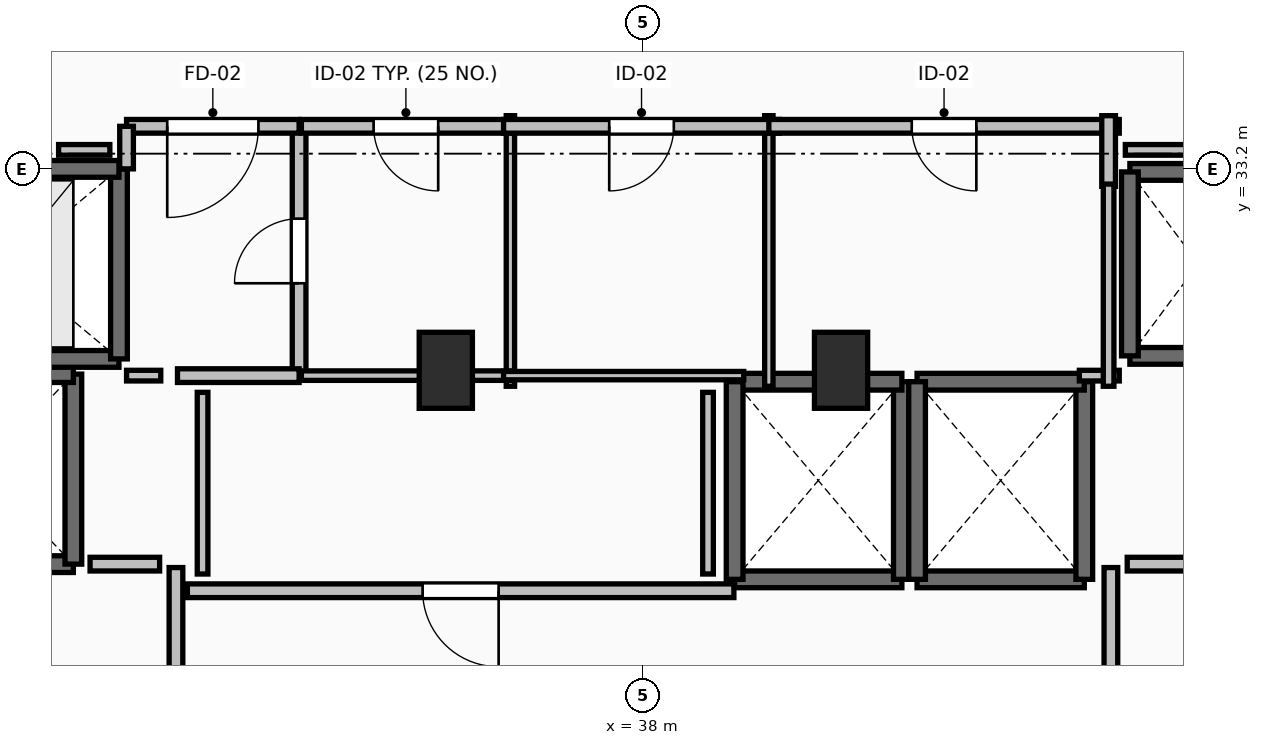
"""IFC4 building model, lengths in metres.
Left out: names, types, materials, properties, quantities, classifications, styles, units other than length and angle.
Written with IfcOpenShell. Run it as: python <this file> out.ifc"""

import sys

from ifc_helpers import new_model, si_unit, direction, frame, frame_2d, origin, origin_2d, place, context, subcontext, project, spatial, rectangle, extrude, element, fill, save


model = new_model("IFC4")
c1 = context("Model", 3, precision=1e-05, world=origin(), true_north=direction((0.0, 1.0)))
c2 = subcontext(c1, "Body", "Model", "MODEL_VIEW")
j1 = project(units=[si_unit("LENGTHUNIT", "METRE"), si_unit("PLANEANGLEUNIT", "RADIAN")], contexts=[c1])
p1 = place(None, origin())
s1 = spatial("IfcSite", under=j1, at=p1, CompositionType="ELEMENT")
p2 = place(p1, origin())
s2 = spatial("IfcBuilding", under=s1, at=p2, CompositionType="ELEMENT")
p3 = place(p2, frame((0.0, 0.0, 196.6)))
s3 = spatial("IfcBuildingStorey", under=s2, at=p3, CompositionType="ELEMENT", Elevation=196.6)
for number, where, z_axis, x_axis in (
    (1, (35.4, 30.55, 0.0), (0.0, 0.0, 1.0), (1.0, 0.0, 0.0)),
    (2, (40.6, 30.55, 0.0), (0.0, 0.0, 1.0), (1.0, 0.0, 0.0)),
):
    element("IfcColumn", number, at=place(p3, frame(where, z_axis=z_axis, x_axis=x_axis)), inside=s3, PredefinedType="PILASTER", context=c2, shape_type="SweptSolid", body=[
        extrude(rectangle(XDim=0.7, YDim=1.0, at=origin_2d()), origin(), (0.0, 0.0, 1.0), 3.5),
    ])
p4 = place(p3, frame((39.2, 27.8, 0.0), z_axis=(0.0, 0.0, 1.0), x_axis=(1.0, 0.0, 0.0)))
e3 = element("IfcWall", 3, at=p4, inside=s3, PredefinedType="SOLIDWALL", context=c2, shape_type="SweptSolid", body=[
    extrude(rectangle(XDim=2.2, YDim=0.22, at=frame_2d((1.1, 0.0))), origin(), (0.0, 0.0, 1.0), 3.24),
])
p5 = place(p3, frame((41.4, 27.8, 0.0), z_axis=(0.0, 0.0, 1.0), x_axis=(0.0, 1.0, 0.0)))
e4 = element("IfcWall", 4, at=p5, inside=s3, PredefinedType="SOLIDWALL", context=c2, shape_type="SweptSolid", body=[
    extrude(rectangle(XDim=2.6, YDim=0.22, at=frame_2d((1.3, 0.0))), origin(), (0.0, 0.0, 1.0), 3.24),
])
p6 = place(p3, frame((41.4, 30.4, 0.0), z_axis=(0.0, 0.0, 1.0), x_axis=(-1.0, 0.0, 0.0)))
e5 = element("IfcWall", 5, at=p6, inside=s3, PredefinedType="SOLIDWALL", context=c2, shape_type="SweptSolid", body=[
    extrude(rectangle(XDim=2.2, YDim=0.22, at=frame_2d((1.1, 0.0))), origin(), (0.0, 0.0, 1.0), 3.24),
])
p7 = place(p3, frame((39.2, 30.4, 0.0), z_axis=(0.0, 0.0, 1.0), x_axis=(0.0, -1.0, 0.0)))
e6 = element("IfcWall", 6, at=p7, inside=s3, PredefinedType="SOLIDWALL", context=c2, shape_type="SweptSolid", body=[
    extrude(rectangle(XDim=2.6, YDim=0.22, at=frame_2d((1.3, 0.0))), origin(), (0.0, 0.0, 1.0), 3.24),
])
p8 = place(p3, frame((41.6, 27.8, 0.0), z_axis=(0.0, 0.0, 1.0), x_axis=(1.0, 0.0, 0.0)))
e7 = element("IfcWall", 7, at=p8, inside=s3, PredefinedType="SOLIDWALL", context=c2, shape_type="SweptSolid", body=[
    extrude(rectangle(XDim=2.2, YDim=0.22, at=frame_2d((1.1, 0.0))), origin(), (0.0, 0.0, 1.0), 3.24),
])
p9 = place(p3, frame((43.8, 27.8, 0.0), z_axis=(0.0, 0.0, 1.0), x_axis=(0.0, 1.0, 0.0)))
e8 = element("IfcWall", 8, at=p9, inside=s3, PredefinedType="SOLIDWALL", context=c2, shape_type="SweptSolid", body=[
    extrude(rectangle(XDim=2.6, YDim=0.22, at=frame_2d((1.3, 0.0))), origin(), (0.0, 0.0, 1.0), 3.24),
])
p10 = place(p3, frame((43.8, 30.4, 0.0), z_axis=(0.0, 0.0, 1.0), x_axis=(-1.0, 0.0, 0.0)))
e9 = element("IfcWall", 9, at=p10, inside=s3, PredefinedType="SOLIDWALL", context=c2, shape_type="SweptSolid", body=[
    extrude(rectangle(XDim=2.2, YDim=0.22, at=frame_2d((1.1, 0.0))), origin(), (0.0, 0.0, 1.0), 3.24),
])
p11 = place(p3, frame((41.6, 30.4, 0.0), z_axis=(0.0, 0.0, 1.0), x_axis=(0.0, -1.0, 0.0)))
e10 = element("IfcWall", 10, at=p11, inside=s3, PredefinedType="SOLIDWALL", context=c2, shape_type="SweptSolid", body=[
    extrude(rectangle(XDim=2.6, YDim=0.22, at=frame_2d((1.3, 0.0))), origin(), (0.0, 0.0, 1.0), 3.24),
])
for number, where, z_axis, x_axis in (
    (11, (44.4, 30.74, 0.0), (0.0, 0.0, 1.0), (1.0, 0.0, 0.0)),
    (12, (46.2, 33.16, 0.0), (0.0, 0.0, 1.0), (-1.0, 0.0, 0.0)),
):
    element("IfcWall", number, at=place(p3, frame(where, z_axis=z_axis, x_axis=x_axis)), inside=s3, PredefinedType="SOLIDWALL", context=c2, shape_type="SweptSolid", body=[
        extrude(rectangle(XDim=1.8, YDim=0.22, at=frame_2d((0.9, 0.0))), origin(), (0.0, 0.0, 1.0), 3.24),
    ])
p12 = place(p3, frame((44.4, 33.16, 0.0), z_axis=(0.0, 0.0, 1.0), x_axis=(0.0, -1.0, 0.0)))
e13 = element("IfcWall", 13, at=p12, inside=s3, PredefinedType="SOLIDWALL", context=c2, shape_type="SweptSolid", body=[
    extrude(rectangle(XDim=2.42, YDim=0.22, at=frame_2d((1.21, 0.0))), origin(), (0.0, 0.0, 1.0), 3.24),
])
p13 = place(p3, frame((28.1, 28.0, 0.0), z_axis=(0.0, 0.0, 1.0), x_axis=(1.0, 0.0, 0.0)))
e14 = element("IfcWall", 14, at=p13, inside=s3, PredefinedType="SHEAR", context=c2, shape_type="SweptSolid", body=[
    extrude(rectangle(XDim=2.4, YDim=0.22, at=frame_2d((1.2, 0.0))), origin(), (0.0, 0.0, 1.0), 3.24),
])
p14 = place(p13, frame((0.6, 0.0, 0.0)))
e15 = element("IfcOpeningElement", 15, at=p14, cuts=e14, PredefinedType="OPENING", context=c2, shape_type="SweptSolid", body=[
    extrude(rectangle(XDim=1.2, YDim=2.2, at=frame_2d((0.6, 1.1))), frame((0.0, 0.125, 0.0), z_axis=(0.0, -1.0, 0.0), x_axis=(1.0, 0.0, 0.0)), (0.0, 0.0, 1.0), 0.25),
])
p15 = place(p3, frame((30.5, 28.0, 0.0), z_axis=(0.0, 0.0, 1.0), x_axis=(0.0, 1.0, 0.0)))
e16 = element("IfcWall", 16, at=p15, inside=s3, PredefinedType="SHEAR", context=c2, shape_type="SweptSolid", body=[
    extrude(rectangle(XDim=2.5, YDim=0.22, at=frame_2d((1.25, 0.0))), origin(), (0.0, 0.0, 1.0), 3.24),
])
p16 = place(p3, frame((30.5, 30.5, 0.0), z_axis=(0.0, 0.0, 1.0), x_axis=(-1.0, 0.0, 0.0)))
e17 = element("IfcWall", 17, at=p16, inside=s3, PredefinedType="SHEAR", context=c2, shape_type="SweptSolid", body=[
    extrude(rectangle(XDim=2.4, YDim=0.22, at=frame_2d((1.2, 0.0))), origin(), (0.0, 0.0, 1.0), 3.24),
])
p17 = place(p3, frame((28.1, 30.7, 0.0), z_axis=(0.0, 0.0, 1.0), x_axis=(1.0, 0.0, 0.0)))
e18 = element("IfcWall", 18, at=p17, inside=s3, PredefinedType="SOLIDWALL", context=c2, shape_type="SweptSolid", body=[
    extrude(rectangle(XDim=3.0, YDim=0.22, at=frame_2d((1.5, 0.0))), origin(), (0.0, 0.0, 1.0), 3.24),
])
p18 = place(p3, frame((31.1, 30.7, 0.0), z_axis=(0.0, 0.0, 1.0), x_axis=(0.0, 1.0, 0.0)))
e19 = element("IfcWall", 19, at=p18, inside=s3, PredefinedType="SOLIDWALL", context=c2, shape_type="SweptSolid", body=[
    extrude(rectangle(XDim=2.5, YDim=0.22, at=frame_2d((1.25, 0.0))), origin(), (0.0, 0.0, 1.0), 3.24),
])
p19 = place(p3, frame((31.1, 33.2, 0.0), z_axis=(0.0, 0.0, 1.0), x_axis=(-1.0, 0.0, 0.0)))
e20 = element("IfcWall", 20, at=p19, inside=s3, PredefinedType="SOLIDWALL", context=c2, shape_type="SweptSolid", body=[
    extrude(rectangle(XDim=3.0, YDim=0.22, at=frame_2d((1.5, 0.0))), origin(), (0.0, 0.0, 1.0), 3.24),
])
p20 = place(p19, frame((0.9, 0.0, 0.0)))
e21 = element("IfcOpeningElement", 21, at=p20, cuts=e20, PredefinedType="OPENING", context=c2, shape_type="SweptSolid", body=[
    extrude(rectangle(XDim=1.2, YDim=2.2, at=frame_2d((0.6, 1.1))), frame((0.0, 0.125, 0.0), z_axis=(0.0, -1.0, 0.0), x_axis=(1.0, 0.0, 0.0)), (0.0, 0.0, 1.0), 0.25),
])
p21 = place(p3, frame((31.85, 24.045, 0.0), z_axis=(0.0, 0.0, 1.0), x_axis=(0.0, 1.0, 0.0)))
e22 = element("IfcWall", 22, at=p21, inside=s3, PredefinedType="PARTITIONING", context=c2, shape_type="SweptSolid", body=[
    extrude(rectangle(XDim=3.91, YDim=0.18, at=frame_2d((1.955, 0.0))), origin(), (0.0, 0.0, 1.0), 3.24),
])
p22 = place(p21, frame((1.355, 0.0, 0.0)))
e23 = element("IfcOpeningElement", 23, at=p22, cuts=e22, PredefinedType="OPENING", context=c2, shape_type="SweptSolid", body=[
    extrude(rectangle(XDim=1.2, YDim=2.15, at=frame_2d((0.6, 1.075))), frame((0.0, 0.105, 0.0), z_axis=(0.0, -1.0, 0.0), x_axis=(1.0, 0.0, 0.0)), (0.0, 0.0, 1.0), 0.21),
])
p23 = place(p3, frame((44.15, 27.955, 0.0), z_axis=(0.0, 0.0, 1.0), x_axis=(0.0, -1.0, 0.0)))
e24 = element("IfcWall", 24, at=p23, inside=s3, PredefinedType="PARTITIONING", context=c2, shape_type="SweptSolid", body=[
    extrude(rectangle(XDim=3.91, YDim=0.18, at=frame_2d((1.955, 0.0))), origin(), (0.0, 0.0, 1.0), 3.24),
])
p24 = place(p23, frame((1.355, 0.0, 0.0)))
e25 = element("IfcOpeningElement", 25, at=p24, cuts=e24, PredefinedType="OPENING", context=c2, shape_type="SweptSolid", body=[
    extrude(rectangle(XDim=1.2, YDim=2.15, at=frame_2d((0.6, 1.075))), frame((0.0, 0.105, 0.0), z_axis=(0.0, -1.0, 0.0), x_axis=(1.0, 0.0, 0.0)), (0.0, 0.0, 1.0), 0.21),
])
p25 = place(p3, frame((33.47, 30.48, 0.0), z_axis=(0.0, 0.0, 1.0), x_axis=(0.0, 1.0, 0.0)))
e26 = element("IfcWall", 26, at=p25, inside=s3, PredefinedType="PARTITIONING", context=c2, shape_type="SweptSolid", body=[
    extrude(rectangle(XDim=3.28, YDim=0.18, at=frame_2d((1.64, 0.0))), origin(), (0.0, 0.0, 1.0), 3.24),
])
p26 = place(p25, frame((1.215, 0.0, 0.0)))
e27 = element("IfcOpeningElement", 27, at=p26, cuts=e26, PredefinedType="OPENING", context=c2, shape_type="SweptSolid", body=[
    extrude(rectangle(XDim=0.85, YDim=2.1, at=frame_2d((0.425, 1.05))), frame((0.0, 0.105, 0.0), z_axis=(0.0, -1.0, 0.0), x_axis=(1.0, 0.0, 0.0)), (0.0, 0.0, 1.0), 0.21),
])
p27 = place(p3, frame((31.87, 30.48, 0.0), z_axis=(0.0, 0.0, 1.0), x_axis=(1.0, 0.0, 0.0)))
e28 = element("IfcWall", 28, at=p27, inside=s3, PredefinedType="PARTITIONING", context=c2, shape_type="SweptSolid", body=[
    extrude(rectangle(XDim=1.6, YDim=0.18, at=frame_2d((0.8, 0.0))), origin(), (0.0, 0.0, 1.0), 3.24),
])
p28 = place(p3, frame((33.47, 33.76, 0.0), z_axis=(0.0, 0.0, 1.0), x_axis=(-1.0, 0.0, 0.0)))
e29 = element("IfcWall", 29, at=p28, inside=s3, PredefinedType="PARTITIONING", context=c2, shape_type="SweptSolid", body=[
    extrude(rectangle(XDim=2.27, YDim=0.18, at=frame_2d((1.135, 0.0))), origin(), (0.0, 0.0, 1.0), 3.24),
])
p29 = place(p28, frame((0.535, 0.0, 0.0)))
e30 = element("IfcOpeningElement", 30, at=p29, cuts=e29, PredefinedType="OPENING", context=c2, shape_type="SweptSolid", body=[
    extrude(rectangle(XDim=1.2, YDim=2.15, at=frame_2d((0.6, 1.075))), frame((0.0, 0.105, 0.0), z_axis=(0.0, -1.0, 0.0), x_axis=(1.0, 0.0, 0.0)), (0.0, 0.0, 1.0), 0.21),
])
p30 = place(p3, frame((31.2, 33.76, 0.0), z_axis=(0.0, 0.0, 1.0), x_axis=(0.0, -1.0, 0.0)))
e31 = element("IfcWall", 31, at=p30, inside=s3, PredefinedType="PARTITIONING", context=c2, shape_type="SweptSolid", body=[
    extrude(rectangle(XDim=0.56, YDim=0.18, at=frame_2d((0.28, 0.0))), origin(), (0.0, 0.0, 1.0), 3.24),
])
p31 = place(p3, frame((39.19, 27.65, 0.0), z_axis=(0.0, 0.0, 1.0), x_axis=(-1.0, 0.0, 0.0)))
e32 = element("IfcWall", 32, at=p31, inside=s3, PredefinedType="PARTITIONING", context=c2, shape_type="SweptSolid", body=[
    extrude(rectangle(XDim=7.19, YDim=0.18, at=frame_2d((3.595, 0.0))), origin(), (0.0, 0.0, 1.0), 3.24),
])
p32 = place(p31, frame((3.095, 0.0, 0.0)))
e33 = element("IfcOpeningElement", 33, at=p32, cuts=e32, PredefinedType="OPENING", context=c2, shape_type="SweptSolid", body=[
    extrude(rectangle(XDim=1.0, YDim=2.15, at=frame_2d((0.5, 1.075))), frame((0.0, 0.105, 0.0), z_axis=(0.0, -1.0, 0.0), x_axis=(1.0, 0.0, 0.0)), (0.0, 0.0, 1.0), 0.21),
])
p33 = place(p3, frame((36.25, 30.34, 0.0), z_axis=(0.0, 0.0, 1.0), x_axis=(0.0, 1.0, 0.0)))
e34 = element("IfcWall", 34, at=p33, inside=s3, PredefinedType="PARTITIONING", context=c2, shape_type="SweptSolid", body=[
    extrude(rectangle(XDim=3.56, YDim=0.11, at=frame_2d((1.78, 0.0))), origin(), (0.0, 0.0, 1.0), 2.432),
])
p34 = place(p3, frame((33.5, 30.48, 0.0), z_axis=(0.0, 0.0, 1.0), x_axis=(1.0, 0.0, 0.0)))
e35 = element("IfcWall", 35, at=p34, inside=s3, PredefinedType="PARTITIONING", context=c2, shape_type="SweptSolid", body=[
    extrude(rectangle(XDim=2.75, YDim=0.125, at=frame_2d((1.375, 0.0))), origin(), (0.0, 0.0, 1.0), 2.432),
])
p35 = place(p3, frame((36.25, 33.76, 0.0), z_axis=(0.0, 0.0, 1.0), x_axis=(-1.0, 0.0, 0.0)))
e36 = element("IfcWall", 36, at=p35, inside=s3, PredefinedType="PARTITIONING", context=c2, shape_type="SweptSolid", body=[
    extrude(rectangle(XDim=2.75, YDim=0.18, at=frame_2d((1.375, 0.0))), origin(), (0.0, 0.0, 1.0), 3.24),
])
p36 = place(p35, frame((0.95, 0.0, 0.0)))
e37 = element("IfcOpeningElement", 37, at=p36, cuts=e36, PredefinedType="OPENING", context=c2, shape_type="SweptSolid", body=[
    extrude(rectangle(XDim=0.85, YDim=2.1, at=frame_2d((0.425, 1.05))), frame((0.0, 0.105, 0.0), z_axis=(0.0, -1.0, 0.0), x_axis=(1.0, 0.0, 0.0)), (0.0, 0.0, 1.0), 0.21),
])
p37 = place(p3, frame((39.65, 30.34, 0.0), z_axis=(0.0, 0.0, 1.0), x_axis=(0.0, 1.0, 0.0)))
e38 = element("IfcWall", 38, at=p37, inside=s3, PredefinedType="PARTITIONING", context=c2, shape_type="SweptSolid", body=[
    extrude(rectangle(XDim=3.56, YDim=0.11, at=frame_2d((1.78, 0.0))), origin(), (0.0, 0.0, 1.0), 2.432),
])
p38 = place(p3, frame((36.16, 30.48, 0.0), z_axis=(0.0, 0.0, 1.0), x_axis=(1.0, 0.0, 0.0)))
e39 = element("IfcWall", 39, at=p38, inside=s3, PredefinedType="PARTITIONING", context=c2, shape_type="SweptSolid", body=[
    extrude(rectangle(XDim=3.16, YDim=0.11, at=frame_2d((1.58, 0.0))), origin(), (0.0, 0.0, 1.0), 2.432),
])
p39 = place(p3, frame((39.79, 33.76, 0.0), z_axis=(0.0, 0.0, 1.0), x_axis=(-1.0, 0.0, 0.0)))
e40 = element("IfcWall", 40, at=p39, inside=s3, PredefinedType="PARTITIONING", context=c2, shape_type="SweptSolid", body=[
    extrude(rectangle(XDim=3.63, YDim=0.18, at=frame_2d((1.815, 0.0))), origin(), (0.0, 0.0, 1.0), 3.24),
])
p40 = place(p39, frame((1.39, 0.0, 0.0)))
e41 = element("IfcOpeningElement", 41, at=p40, cuts=e40, PredefinedType="OPENING", context=c2, shape_type="SweptSolid", body=[
    extrude(rectangle(XDim=0.85, YDim=2.1, at=frame_2d((0.425, 1.05))), frame((0.0, 0.105, 0.0), z_axis=(0.0, -1.0, 0.0), x_axis=(1.0, 0.0, 0.0)), (0.0, 0.0, 1.0), 0.21),
])
p41 = place(p3, frame((44.26, 33.76, 0.0), z_axis=(0.0, 0.0, 1.0), x_axis=(-1.0, 0.0, 0.0)))
e42 = element("IfcWall", 42, at=p41, inside=s3, PredefinedType="PARTITIONING", context=c2, shape_type="SweptSolid", body=[
    extrude(rectangle(XDim=4.61, YDim=0.18, at=frame_2d((2.305, 0.0))), origin(), (0.0, 0.0, 1.0), 3.24),
])
p42 = place(p41, frame((1.88, 0.0, 0.0)))
e43 = element("IfcOpeningElement", 43, at=p42, cuts=e42, PredefinedType="OPENING", context=c2, shape_type="SweptSolid", body=[
    extrude(rectangle(XDim=0.85, YDim=2.1, at=frame_2d((0.425, 1.05))), frame((0.0, 0.105, 0.0), z_axis=(0.0, -1.0, 0.0), x_axis=(1.0, 0.0, 0.0)), (0.0, 0.0, 1.0), 0.21),
])
p43 = place(p3, frame((44.12, 32.97, 0.0), z_axis=(0.0, 0.0, 1.0), x_axis=(0.0, 1.0, 0.0)))
e44 = element("IfcWall", 44, at=p43, inside=s3, PredefinedType="PARTITIONING", context=c2, shape_type="SweptSolid", body=[
    extrude(rectangle(XDim=0.93, YDim=0.18, at=frame_2d((0.465, 0.0))), origin(), (0.0, 0.0, 1.0), 3.24),
])
for number, where, z_axis, x_axis in (
    (45, (31.635, 28.0, 0.0), (0.0, 0.0, 1.0), (-1.0, 0.0, 0.0)),
    (46, (45.28, 28.0, 0.0), (0.0, 0.0, 1.0), (-1.0, 0.0, 0.0)),
):
    element("IfcWall", number, at=place(p3, frame(where, z_axis=z_axis, x_axis=x_axis)), inside=s3, PredefinedType="PARTITIONING", context=c2, shape_type="SweptSolid", body=[
        extrude(rectangle(XDim=0.915, YDim=0.18, at=frame_2d((0.458, 0.0))), origin(), (0.0, 0.0, 1.0), 3.24),
    ])
p44 = place(p3, frame((31.2, 30.48, 0.0), z_axis=(0.0, 0.0, 1.0), x_axis=(1.0, 0.0, 0.0)))
e47 = element("IfcWall", 47, at=p44, inside=s3, PredefinedType="PARTITIONING", context=c2, shape_type="SweptSolid", body=[
    extrude(rectangle(XDim=0.45, YDim=0.14, at=frame_2d((0.225, 0.0))), origin(), (0.0, 0.0, 1.0), 3.24),
])
p45 = place(p3, frame((43.735, 30.48, 0.0), z_axis=(0.0, 0.0, 1.0), x_axis=(1.0, 0.0, 0.0)))
e48 = element("IfcWall", 48, at=p45, inside=s3, PredefinedType="PARTITIONING", context=c2, shape_type="SweptSolid", body=[
    extrude(rectangle(XDim=0.525, YDim=0.14, at=frame_2d((0.262, 0.0))), origin(), (0.0, 0.0, 1.0), 3.24),
])
p46 = place(p3, frame((44.12, 30.34, 0.0), z_axis=(0.0, 0.0, 1.0), x_axis=(0.0, 1.0, 0.0)))
e49 = element("IfcWall", 49, at=p46, inside=s3, PredefinedType="PARTITIONING", context=c2, shape_type="SweptSolid", body=[
    extrude(rectangle(XDim=2.66, YDim=0.14, at=frame_2d((1.33, 0.0))), origin(), (0.0, 0.0, 1.0), 3.24),
])
for number, where, z_axis, x_axis in (
    (50, (32.2, 30.26, 0.0), (0.0, 0.0, 1.0), (0.0, -1.0, 0.0)),
    (51, (38.85, 27.87, 0.0), (0.0, 0.0, 1.0), (0.0, 1.0, 0.0)),
):
    element("IfcWall", number, at=place(p3, frame(where, z_axis=z_axis, x_axis=x_axis)), inside=s3, PredefinedType="PARTITIONING", context=c2, shape_type="SweptSolid", body=[
        extrude(rectangle(XDim=2.39, YDim=0.14, at=frame_2d((1.195, 0.0))), origin(), (0.0, 0.0, 1.0), 3.24),
    ])
p47 = place(p3, frame((48.55, 33.45, 0.0), z_axis=(0.0, 0.0, 1.0), x_axis=(-1.0, 0.0, 0.0)))
e52 = element("IfcWall", 52, at=p47, inside=s3, PredefinedType="PARTITIONING", context=c2, shape_type="SweptSolid", body=[
    extrude(rectangle(XDim=4.21, YDim=0.14, at=frame_2d((2.105, 0.0))), origin(), (0.0, 0.0, 1.0), 2.432),
])
p48 = place(p3, frame((30.98, 33.45, 0.0), z_axis=(0.0, 0.0, 1.0), x_axis=(-1.0, 0.0, 0.0)))
e53 = element("IfcWall", 53, at=p48, inside=s3, PredefinedType="PARTITIONING", context=c2, shape_type="SweptSolid", body=[
    extrude(rectangle(XDim=0.674, YDim=0.14, at=frame_2d((0.337, 0.0))), origin(), (0.0, 0.0, 1.0), 3.24),
])
p49 = place(p26, origin())
e54 = element("IfcDoor", 54, at=p49, inside=s3, OperationType="SINGLE_SWING_LEFT", PredefinedType="DOOR", context=c2, shape_type="SweptSolid", body=[
    extrude(rectangle(XDim=0.85, YDim=2.1, at=frame_2d((0.425, 1.05))), frame((0.0, 0.025, 0.0), z_axis=(0.0, -1.0, 0.0), x_axis=(1.0, 0.0, 0.0)), (0.0, 0.0, 1.0), 0.05),
])
fill(e27, e54)
p50 = place(p29, origin())
e55 = element("IfcDoor", 55, at=p50, inside=s3, OperationType="SINGLE_SWING_RIGHT", PredefinedType="DOOR", context=c2, shape_type="SweptSolid", body=[
    extrude(rectangle(XDim=1.2, YDim=2.15, at=frame_2d((0.6, 1.075))), frame((0.0, 0.025, 0.0), z_axis=(0.0, -1.0, 0.0), x_axis=(1.0, 0.0, 0.0)), (0.0, 0.0, 1.0), 0.05),
])
fill(e30, e55)
p51 = place(p32, origin())
e56 = element("IfcDoor", 56, at=p51, inside=s3, OperationType="SINGLE_SWING_LEFT", PredefinedType="DOOR", context=c2, shape_type="SweptSolid", body=[
    extrude(rectangle(XDim=1.0, YDim=2.15, at=frame_2d((0.5, 1.075))), frame((0.0, 0.025, 0.0), z_axis=(0.0, -1.0, 0.0), x_axis=(1.0, 0.0, 0.0)), (0.0, 0.0, 1.0), 0.05),
])
fill(e33, e56)
p52 = place(p36, origin())
e57 = element("IfcDoor", 57, at=p52, inside=s3, OperationType="SINGLE_SWING_LEFT", PredefinedType="DOOR", context=c2, shape_type="SweptSolid", body=[
    extrude(rectangle(XDim=0.85, YDim=2.1, at=frame_2d((0.425, 1.05))), frame((0.0, 0.025, 0.0), z_axis=(0.0, -1.0, 0.0), x_axis=(1.0, 0.0, 0.0)), (0.0, 0.0, 1.0), 0.05),
])
fill(e37, e57)
p53 = place(p40, origin())
e58 = element("IfcDoor", 58, at=p53, inside=s3, OperationType="SINGLE_SWING_RIGHT", PredefinedType="DOOR", context=c2, shape_type="SweptSolid", body=[
    extrude(rectangle(XDim=0.85, YDim=2.1, at=frame_2d((0.425, 1.05))), frame((0.0, 0.025, 0.0), z_axis=(0.0, -1.0, 0.0), x_axis=(1.0, 0.0, 0.0)), (0.0, 0.0, 1.0), 0.05),
])
fill(e41, e58)
p54 = place(p42, origin())
e59 = element("IfcDoor", 59, at=p54, inside=s3, OperationType="SINGLE_SWING_LEFT", PredefinedType="DOOR", context=c2, shape_type="SweptSolid", body=[
    extrude(rectangle(XDim=0.85, YDim=2.1, at=frame_2d((0.425, 1.05))), frame((0.0, 0.025, 0.0), z_axis=(0.0, -1.0, 0.0), x_axis=(1.0, 0.0, 0.0)), (0.0, 0.0, 1.0), 0.05),
])
fill(e43, e59)
save(model, sys.argv[1])
